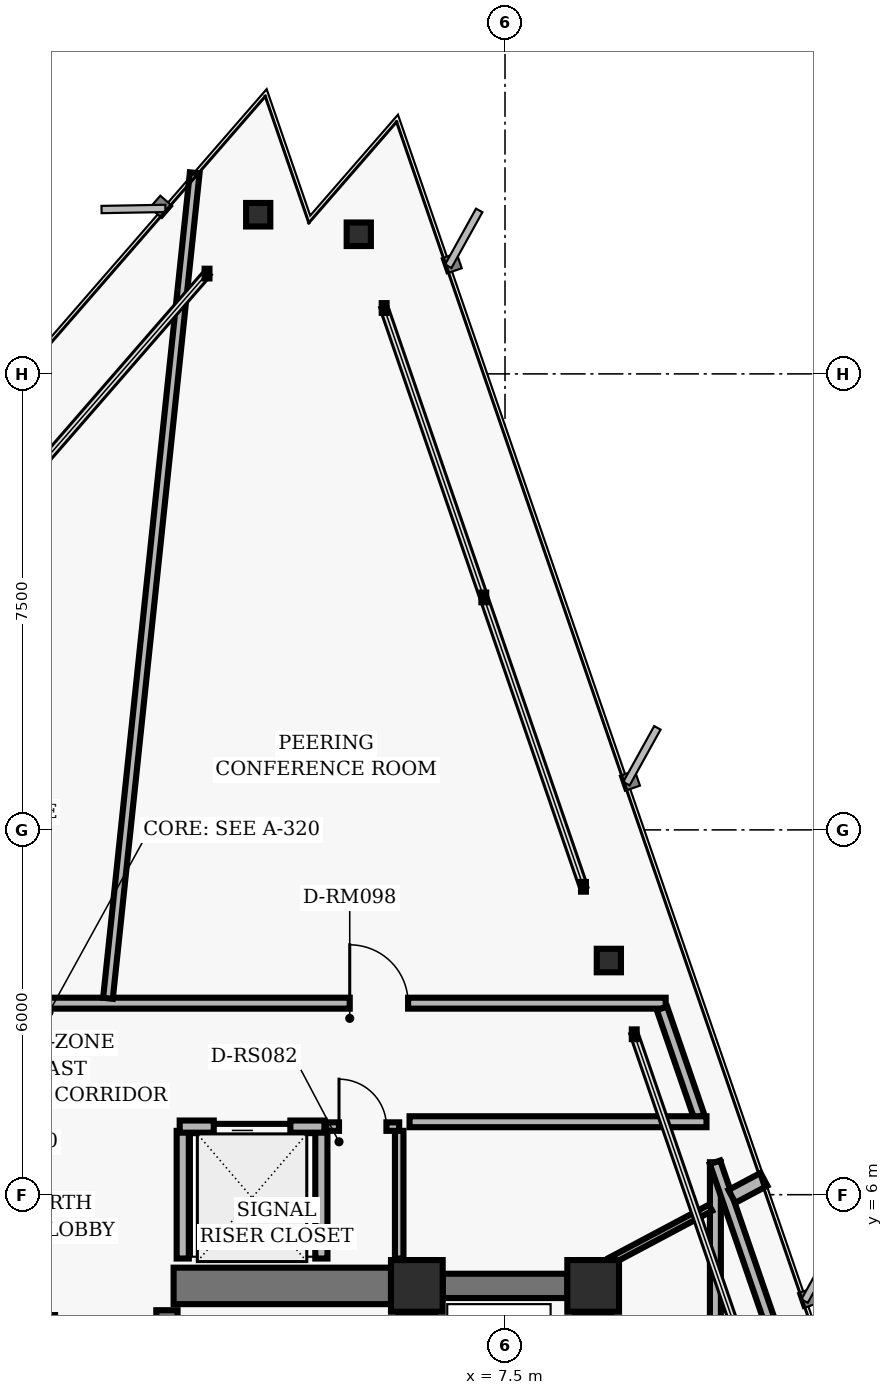
"""IFC4 building model, lengths in metres.
Left out: names, types, materials, properties, quantities, classifications, styles, units other than length and angle.
Written with IfcOpenShell. Run it as: python <this file> out.ifc"""

import sys

from ifc_helpers import new_model, si_unit, direction, frame, frame_2d, origin, origin_2d, place, context, subcontext, project, spatial, rectangle, hollow_rectangle, i_section, extrude, element, fill, save


model = new_model("IFC4")
c1 = context("Model", 3, precision=1e-05, world=origin(), true_north=direction((0.0, 1.0)))
c2 = subcontext(c1, "Body", "Model", "MODEL_VIEW")
j1 = project(units=[si_unit("LENGTHUNIT", "METRE"), si_unit("PLANEANGLEUNIT", "RADIAN")], contexts=[c1])
p1 = place(None, origin())
s1 = spatial("IfcSite", under=j1, at=p1, CompositionType="ELEMENT")
p2 = place(p1, origin())
s2 = spatial("IfcBuilding", under=s1, at=p2, CompositionType="ELEMENT")
p3 = place(p2, frame((0.0, 0.0, 165.44)))
s3 = spatial("IfcBuildingStorey", under=s2, at=p3, CompositionType="ELEMENT", Elevation=165.44)
for number, where, z_axis, x_axis in (
    (1, (6.05, 4.5, 0.0), (0.0, 0.0, 1.0), (1.0, 0.0, 0.0)),
    (2, (8.95, 4.5, 0.0), (0.0, 0.0, 1.0), (1.0, 0.0, 0.0)),
):
    element("IfcColumn", number, at=place(p3, frame(where, z_axis=z_axis, x_axis=x_axis)), inside=s3, PredefinedType="COLUMN", context=c2, shape_type="SweptSolid", body=[
        extrude(hollow_rectangle(XDim=0.85, YDim=0.85, WallThickness=0.055, InnerFilletRadius=0.02, OuterFilletRadius=0.04, at=origin_2d()), origin(), (0.0, 0.0, 1.0), 3.04),
    ])
p4 = place(p3, frame((6.05, 0.425, 0.0), z_axis=(0.0, 0.0, 1.0), x_axis=(0.0, 1.0, 0.0)))
e3 = element("IfcWall", 3, at=p4, inside=s3, PredefinedType="SHEAR", context=c2, shape_type="SweptSolid", body=[
    extrude(rectangle(XDim=3.65, YDim=0.6, at=frame_2d((1.825, 0.0))), origin(), (0.0, 0.0, 1.0), 2.788),
])
p5 = place(p3, frame((1.94, -4.1, 0.0), z_axis=(0.0, 0.0, 1.0), x_axis=(0.0, 1.0, 0.0)))
e4 = element("IfcWall", 4, at=p5, inside=s3, PredefinedType="SHEAR", context=c2, shape_type="SweptSolid", body=[
    extrude(rectangle(XDim=8.2, YDim=0.35, at=frame_2d((4.1, 0.0))), origin(), (0.0, 0.0, 1.0), 2.788),
])
p6 = place(p3, frame((2.05, 4.5, 0.0), z_axis=(0.0, 0.0, 1.0), x_axis=(1.0, 0.0, 0.0)))
e5 = element("IfcWall", 5, at=p6, inside=s3, PredefinedType="SHEAR", context=c2, shape_type="SweptSolid", body=[
    extrude(rectangle(XDim=3.575, YDim=0.6, at=frame_2d((1.788, 0.0))), origin(), (0.0, 0.0, 1.0), 2.788),
])
p7 = place(p3, frame((8.95, -3.875, 0.0), z_axis=(0.0, 0.0, 1.0), x_axis=(0.0, 1.0, 0.0)))
e6 = element("IfcWall", 6, at=p7, inside=s3, PredefinedType="SHEAR", context=c2, shape_type="SweptSolid", body=[
    extrude(rectangle(XDim=7.95, YDim=0.6, at=frame_2d((3.975, 0.0))), origin(), (0.0, 0.0, 1.0), 2.788),
])
p8 = place(p7, frame((0.55, 0.0, 0.0)))
e7 = element("IfcOpeningElement", 7, at=p8, cuts=e6, PredefinedType="OPENING", context=c2, shape_type="SweptSolid", body=[
    extrude(rectangle(XDim=1.06, YDim=2.04, at=frame_2d((0.53, 1.02))), frame((0.0, 0.31, 0.0), z_axis=(0.0, -1.0, 0.0), x_axis=(1.0, 0.0, 0.0)), (0.0, 0.0, 1.0), 0.62),
])
p9 = place(p7, frame((3.445, 0.0, 0.0)))
e8 = element("IfcOpeningElement", 8, at=p9, cuts=e6, PredefinedType="OPENING", context=c2, shape_type="SweptSolid", body=[
    extrude(rectangle(XDim=1.06, YDim=2.04, at=frame_2d((0.53, 1.02))), frame((0.0, 0.31, 0.0), z_axis=(0.0, -1.0, 0.0), x_axis=(1.0, 0.0, 0.0)), (0.0, 0.0, 1.0), 0.62),
])
p10 = place(p7, frame((6.33, 0.0, 0.0)))
e9 = element("IfcOpeningElement", 9, at=p10, cuts=e6, PredefinedType="OPENING", context=c2, shape_type="SweptSolid", body=[
    extrude(rectangle(XDim=1.06, YDim=2.04, at=frame_2d((0.53, 1.02))), frame((0.0, 0.31, 0.0), z_axis=(0.0, -1.0, 0.0), x_axis=(1.0, 0.0, 0.0)), (0.0, 0.0, 1.0), 0.62),
])
p11 = place(p3, frame((6.475, 4.5, 0.0), z_axis=(0.0, 0.0, 1.0), x_axis=(1.0, 0.0, 0.0)))
e10 = element("IfcWall", 10, at=p11, inside=s3, PredefinedType="SHEAR", context=c2, shape_type="SweptSolid", body=[
    extrude(rectangle(XDim=2.05, YDim=0.4, at=frame_2d((1.025, 0.0))), origin(), (0.0, 0.0, 1.0), 2.788),
])
for number, where, z_axis, x_axis in (
    (11, (9.208, 9.851, 0.0), (0.0, 0.0, 1.0), (1.0, 0.0, 0.0)),
    (12, (5.095, 21.796, 0.0), (0.0, 0.0, 1.0), (1.0, 0.0, 0.0)),
    (13, (3.441, 22.118, 0.0), (0.0, 0.0, 1.0), (1.0, 0.0, 0.0)),
):
    element("IfcColumn", number, at=place(p3, frame(where, z_axis=z_axis, x_axis=x_axis)), inside=s3, PredefinedType="COLUMN", context=c2, shape_type="SweptSolid", body=[
        extrude(i_section(OverallWidth=0.398, OverallDepth=0.387, WebThickness=0.021, FlangeThickness=0.033, FilletRadius=0.018, at=origin_2d()), origin(), (0.0, 0.0, 1.0), 3.04),
    ])
p12 = place(p3, frame((0.0, 1.25, 0.0), z_axis=(0.0, 0.0, 1.0), x_axis=(0.0, 1.0, 0.0)))
e14 = element("IfcWall", 14, at=p12, inside=s3, PredefinedType="PARTITIONING", context=c2, shape_type="SweptSolid", body=[
    extrude(rectangle(XDim=2.77, YDim=0.2, at=frame_2d((1.385, 0.0))), origin(), (0.0, 0.0, 1.0), 2.763),
])
for number, where, z_axis, x_axis in (
    (15, (2.2, 4.95, 0.0), (0.0, 0.0, 1.0), (0.0, 1.0, 0.0)),
    (16, (4.48, 4.95, 0.0), (0.0, 0.0, 1.0), (0.0, 1.0, 0.0)),
):
    element("IfcWall", number, at=place(p3, frame(where, z_axis=z_axis, x_axis=x_axis)), inside=s3, PredefinedType="PARTITIONING", context=c2, shape_type="SweptSolid", body=[
        extrude(rectangle(XDim=2.1, YDim=0.2, at=frame_2d((1.05, 0.0))), origin(), (0.0, 0.0, 1.0), 2.763),
    ])
p13 = place(p3, frame((2.15, 7.12, 0.0), z_axis=(0.0, 0.0, 1.0), x_axis=(1.0, 0.0, 0.0)))
e17 = element("IfcWall", 17, at=p13, inside=s3, PredefinedType="PARTITIONING", context=c2, shape_type="SweptSolid", body=[
    extrude(rectangle(XDim=2.38, YDim=0.2, at=frame_2d((1.19, 0.0))), origin(), (0.0, 0.0, 1.0), 2.763),
])
p14 = place(p13, frame((0.56, 0.0, 0.0)))
e18 = element("IfcOpeningElement", 18, at=p14, cuts=e17, PredefinedType="OPENING", context=c2, shape_type="SweptSolid", body=[
    extrude(rectangle(XDim=1.26, YDim=2.06, at=frame_2d((0.63, 1.03))), frame((0.0, 0.11, 0.0), z_axis=(0.0, -1.0, 0.0), x_axis=(1.0, 0.0, 0.0)), (0.0, 0.0, 1.0), 0.22),
])
p15 = place(p3, frame((5.76, 4.95, 0.0), z_axis=(0.0, 0.0, 1.0), x_axis=(0.0, 1.0, 0.0)))
e19 = element("IfcWall", 19, at=p15, inside=s3, PredefinedType="PARTITIONING", context=c2, shape_type="SweptSolid", body=[
    extrude(rectangle(XDim=2.1, YDim=0.14, at=frame_2d((1.05, 0.0))), origin(), (0.0, 0.0, 1.0), 2.763),
])
p16 = place(p3, frame((4.56, 7.12, 0.0), z_axis=(0.0, 0.0, 1.0), x_axis=(1.0, 0.0, 0.0)))
e20 = element("IfcWall", 20, at=p16, inside=s3, PredefinedType="PARTITIONING", context=c2, shape_type="SweptSolid", body=[
    extrude(rectangle(XDim=1.2, YDim=0.14, at=frame_2d((0.6, 0.0))), origin(), (0.0, 0.0, 1.0), 2.763),
])
p17 = place(p16, frame((0.21, 0.0, 0.0)))
e21 = element("IfcOpeningElement", 21, at=p17, cuts=e20, PredefinedType="OPENING", context=c2, shape_type="SweptSolid", body=[
    extrude(rectangle(XDim=0.78, YDim=2.01, at=frame_2d((0.39, 1.005))), frame((0.0, 0.08, 0.0), z_axis=(0.0, -1.0, 0.0), x_axis=(1.0, 0.0, 0.0)), (0.0, 0.0, 1.0), 0.16),
])
p18 = place(p3, frame((-6.52, 9.15, 0.0), z_axis=(0.0, 0.0, 1.0), x_axis=(1.0, 0.0, 0.0)))
e22 = element("IfcWall", 22, at=p18, inside=s3, PredefinedType="PARTITIONING", context=c2, shape_type="SweptSolid", body=[
    extrude(rectangle(XDim=16.662, YDim=0.18, at=frame_2d((8.331, 0.0))), origin(), (0.0, 0.0, 1.0), 2.763),
])
p19 = place(p18, frame((11.466, 0.0, 0.0)))
e23 = element("IfcOpeningElement", 23, at=p19, cuts=e22, PredefinedType="OPENING", context=c2, shape_type="SweptSolid", body=[
    extrude(rectangle(XDim=0.96, YDim=2.02, at=frame_2d((0.48, 1.01))), frame((0.0, 0.1, 0.0), z_axis=(0.0, -1.0, 0.0), x_axis=(1.0, 0.0, 0.0)), (0.0, 0.0, 1.0), 0.2),
])
p20 = place(p18, frame((3.395, 0.0, 0.0)))
e24 = element("IfcOpeningElement", 24, at=p20, cuts=e22, PredefinedType="OPENING", context=c2, shape_type="SweptSolid", body=[
    extrude(rectangle(XDim=0.96, YDim=2.02, at=frame_2d((0.48, 1.01))), frame((0.0, 0.1, 0.0), z_axis=(0.0, -1.0, 0.0), x_axis=(1.0, 0.0, 0.0)), (0.0, 0.0, 1.0), 0.2),
])
p21 = place(p3, frame((10.082, 9.065, 0.0), z_axis=(0.0, 0.0, 1.0), x_axis=(0.325550958337, -0.945524496524, 0.0)))
e25 = element("IfcWall", 25, at=p21, inside=s3, PredefinedType="PARTITIONING", context=c2, shape_type="SweptSolid", body=[
    extrude(rectangle(XDim=1.882, YDim=0.18, at=frame_2d((0.941, 0.0))), origin(), (0.0, 0.0, 1.0), 2.763),
])
p22 = place(p3, frame((10.814, 7.2, 0.0), z_axis=(0.0, 0.0, 1.0), x_axis=(-1.0, 0.0, 0.0)))
e26 = element("IfcWall", 26, at=p22, inside=s3, PredefinedType="PARTITIONING", context=c2, shape_type="SweptSolid", body=[
    extrude(rectangle(XDim=4.884, YDim=0.18, at=frame_2d((2.442, 0.0))), origin(), (0.0, 0.0, 1.0), 2.763),
])
p23 = place(p3, frame((10.96, 3.84, 0.0), z_axis=(0.0, 0.0, 1.0), x_axis=(0.0, 1.0, 0.0)))
e27 = element("IfcWall", 27, at=p23, inside=s3, PredefinedType="PARTITIONING", context=c2, shape_type="SweptSolid", body=[
    extrude(rectangle(XDim=2.694, YDim=0.18, at=frame_2d((1.347, 0.0))), origin(), (0.0, 0.0, 1.0), 2.33),
])
p24 = place(p3, frame((10.954, 6.533, 0.0), z_axis=(0.0, 0.0, 1.0), x_axis=(0.325553439946, -0.945523642084, 0.0)))
e28 = element("IfcWall", 28, at=p24, inside=s3, PredefinedType="PARTITIONING", context=c2, shape_type="SweptSolid", body=[
    extrude(rectangle(XDim=11.22, YDim=0.18, at=frame_2d((5.61, 0.0))), origin(), (0.0, 0.0, 1.0), 2.763),
])
p25 = place(p24, frame((5.311, 0.0, 0.0)))
e29 = element("IfcOpeningElement", 29, at=p25, cuts=e28, PredefinedType="OPENING", context=c2, shape_type="SweptSolid", body=[
    extrude(rectangle(XDim=0.96, YDim=2.02, at=frame_2d((0.48, 1.01))), frame((0.0, 0.1, 0.0), z_axis=(0.0, -1.0, 0.0), x_axis=(1.0, 0.0, 0.0)), (0.0, 0.0, 1.0), 0.2),
])
p26 = place(p3, frame((9.234, 4.91, 0.0), z_axis=(0.0, 0.0, 1.0), x_axis=(0.882932473202, 0.46949999762, 0.0)))
e30 = element("IfcWall", 30, at=p26, inside=s3, PredefinedType="MOVABLE", context=c2, shape_type="SweptSolid", body=[
    extrude(rectangle(XDim=1.864, YDim=0.115, at=frame_2d((0.932, 0.0))), origin(), (0.0, 0.0, 1.0), 2.763),
])
p27 = place(p3, frame((11.231, 5.972, 0.0), z_axis=(0.0, 0.0, 1.0), x_axis=(0.882951671469, 0.469463891956, 0.0)))
e31 = element("IfcWall", 31, at=p27, inside=s3, PredefinedType="PARTITIONING", context=c2, shape_type="SweptSolid", body=[
    extrude(rectangle(XDim=0.597, YDim=0.24, at=frame_2d((0.299, 0.0))), origin(), (0.0, 0.0, 1.0), 2.763),
])
p28 = place(p3, frame((0.97, 9.23, 0.0), z_axis=(0.0, 0.0, 1.0), x_axis=(0.10452931889, 0.994521805438, 0.0)))
e32 = element("IfcWall", 32, at=p28, inside=s3, PredefinedType="PARTITIONING", context=c2, shape_type="SweptSolid", body=[
    extrude(rectangle(XDim=13.652, YDim=0.16, at=frame_2d((6.826, 0.0))), origin(), (0.0, 0.0, 1.0), 2.763),
])
p29 = place(p14, origin())
e33 = element("IfcDoor", 33, at=p29, inside=s3, OperationType="SLIDING_TO_LEFT", PredefinedType="DOOR", context=c2, shape_type="SweptSolid", body=[
    extrude(rectangle(XDim=1.26, YDim=2.06, at=frame_2d((0.63, 1.03))), frame((0.0, 0.025, 0.0), z_axis=(0.0, -1.0, 0.0), x_axis=(1.0, 0.0, 0.0)), (0.0, 0.0, 1.0), 0.05),
])
fill(e18, e33)
p30 = place(p17, origin())
e34 = element("IfcDoor", 34, at=p30, inside=s3, OperationType="SINGLE_SWING_LEFT", PredefinedType="DOOR", context=c2, shape_type="SweptSolid", body=[
    extrude(rectangle(XDim=0.78, YDim=2.01, at=frame_2d((0.39, 1.005))), frame((0.0, 0.025, 0.0), z_axis=(0.0, -1.0, 0.0), x_axis=(1.0, 0.0, 0.0)), (0.0, 0.0, 1.0), 0.05),
])
fill(e21, e34)
p31 = place(p19, origin())
e35 = element("IfcDoor", 35, at=p31, inside=s3, OperationType="SINGLE_SWING_LEFT", PredefinedType="DOOR", context=c2, shape_type="SweptSolid", body=[
    extrude(rectangle(XDim=0.96, YDim=2.02, at=frame_2d((0.48, 1.01))), frame((0.0, 0.025, 0.0), z_axis=(0.0, -1.0, 0.0), x_axis=(1.0, 0.0, 0.0)), (0.0, 0.0, 1.0), 0.05),
])
fill(e23, e35)
save(model, sys.argv[1])
